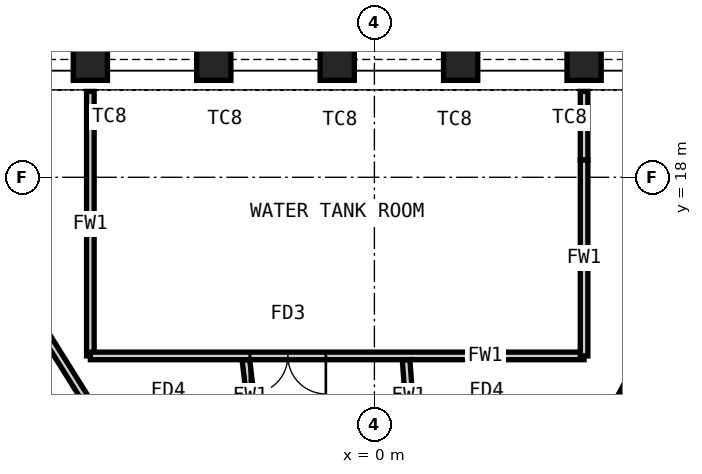
"""IFC4 building model, lengths in metres.
Left out: names, types, materials, properties, quantities, classifications, styles, units other than length and angle.
Written with IfcOpenShell. Run it as: python <this file> out.ifc"""

import sys

from ifc_helpers import new_model, si_unit, direction, frame, frame_2d, origin, origin_2d, place, context, subcontext, project, spatial, rectangle, hollow_rectangle, extrude, element, fill, save


model = new_model("IFC4")
c1 = context("Model", 3, precision=1e-05, world=origin(), true_north=direction((0.0, 1.0)))
c2 = subcontext(c1, "Body", "Model", "MODEL_VIEW")
j1 = project(units=[si_unit("LENGTHUNIT", "METRE"), si_unit("PLANEANGLEUNIT", "RADIAN")], contexts=[c1])
p1 = place(None, origin())
s1 = spatial("IfcSite", under=j1, at=p1, CompositionType="ELEMENT")
p2 = place(p1, origin())
s2 = spatial("IfcBuilding", under=s1, at=p2, CompositionType="ELEMENT")
p3 = place(p2, frame((0.0, 0.0, 337.6)))
s3 = spatial("IfcBuildingStorey", under=s2, at=p3, CompositionType="ELEMENT", Elevation=337.6)
for number, where, z_axis, x_axis in (
    (1, (-7.474, 21.0, 0.0), (0.0, 0.0, 1.0), (-1.0, 0.0, 0.0)),
    (2, (-4.226, 21.0, 0.0), (0.0, 0.0, 1.0), (-1.0, 0.0, 0.0)),
    (3, (-0.978, 21.0, 0.0), (0.0, 0.0, 1.0), (-1.0, 0.0, 0.0)),
    (4, (2.27, 21.0, 0.0), (0.0, 0.0, 1.0), (-1.0, 0.0, 0.0)),
    (5, (5.518, 21.0, 0.0), (0.0, 0.0, 1.0), (-1.0, 0.0, 0.0)),
):
    element("IfcColumn", number, at=place(p3, frame(where, z_axis=z_axis, x_axis=x_axis)), inside=s3, PredefinedType="COLUMN", context=c2, shape_type="SweptSolid", body=[
        extrude(hollow_rectangle(XDim=0.9, YDim=0.9, WallThickness=0.05, at=origin_2d()), origin(), (0.0, 0.0, 1.0), 6.0),
    ])
p4 = place(p3, frame((-7.474, 20.26, 0.0), z_axis=(0.0, 0.0, 1.0), x_axis=(0.0, -1.0, 0.0)))
e6 = element("IfcWall", 6, at=p4, inside=s3, PredefinedType="PARTITIONING", context=c2, shape_type="SweptSolid", body=[
    extrude(rectangle(XDim=6.96, YDim=0.2, at=frame_2d((3.48, 0.0))), origin(), (0.0, 0.0, 1.0), 5.75),
])
p5 = place(p3, frame((5.518, 20.26, 0.0), z_axis=(0.0, 0.0, 1.0), x_axis=(0.0, -1.0, 0.0)))
e7 = element("IfcWall", 7, at=p5, inside=s3, PredefinedType="PARTITIONING", context=c2, shape_type="SweptSolid", body=[
    extrude(rectangle(XDim=1.805, YDim=0.2, at=frame_2d((0.902, 0.0))), origin(), (0.0, 0.0, 1.0), 4.65),
])
p6 = place(p3, frame((-7.474, 13.3, 0.0), z_axis=(0.0, 0.0, 1.0), x_axis=(1.0, 0.0, 0.0)))
e8 = element("IfcWall", 8, at=p6, inside=s3, PredefinedType="PARTITIONING", context=c2, shape_type="SweptSolid", body=[
    extrude(rectangle(XDim=12.992, YDim=0.2, at=frame_2d((6.496, 0.0))), origin(), (0.0, 0.0, 1.0), 5.75),
])
p7 = place(p6, frame((4.197, 0.0, 0.0)))
e9 = element("IfcOpeningElement", 9, at=p7, cuts=e8, PredefinedType="OPENING", context=c2, shape_type="SweptSolid", body=[
    extrude(rectangle(XDim=2.0, YDim=2.4, at=frame_2d((1.0, 1.2))), frame((0.0, 0.11, 0.0), z_axis=(0.0, -1.0, 0.0), x_axis=(1.0, 0.0, 0.0)), (0.0, 0.0, 1.0), 0.22),
])
p8 = place(p3, frame((0.834, 13.195, 0.0), z_axis=(0.0, 0.0, 1.0), x_axis=(0.073292493621, -0.997310488453, 0.0)))
e10 = element("IfcWall", 10, at=p8, inside=s3, PredefinedType="PARTITIONING", context=c2, shape_type="SweptSolid", body=[
    extrude(rectangle(XDim=1.925, YDim=0.2, at=frame_2d((0.963, 0.0))), origin(), (0.0, 0.0, 1.0), 4.65),
])
p9 = place(p3, frame((-3.153, 11.275, 0.0), z_axis=(0.0, 0.0, 1.0), x_axis=(-0.118049862702, 0.993007668609, 0.0)))
e11 = element("IfcWall", 11, at=p9, inside=s3, PredefinedType="PARTITIONING", context=c2, shape_type="SweptSolid", body=[
    extrude(rectangle(XDim=1.934, YDim=0.2, at=frame_2d((0.967, 0.0))), origin(), (0.0, 0.0, 1.0), 4.85),
])
p10 = place(p3, frame((5.995, 11.275, 0.0), z_axis=(0.0, 0.0, 1.0), x_axis=(0.469452402124, 0.882957780497, 0.0)))
e12 = element("IfcWall", 12, at=p10, inside=s3, PredefinedType="PARTITIONING", context=c2, shape_type="SweptSolid", body=[
    extrude(rectangle(XDim=9.229, YDim=0.2, at=frame_2d((4.615, 0.0))), origin(), (0.0, 0.0, 1.0), 5.75),
])
p11 = place(p3, frame((-7.045, 11.275, 0.0), z_axis=(0.0, 0.0, 1.0), x_axis=(-0.529918611936, 0.848048503756, 0.0)))
e13 = element("IfcWall", 13, at=p11, inside=s3, PredefinedType="PARTITIONING", context=c2, shape_type="SweptSolid", body=[
    extrude(rectangle(XDim=9.562, YDim=0.2, at=frame_2d((4.781, 0.0))), origin(), (0.0, 0.0, 1.0), 5.75),
])
p12 = place(p3, frame((5.518, 18.455, 0.0), z_axis=(0.0, 0.0, 1.0), x_axis=(0.0, -1.0, 0.0)))
e14 = element("IfcWall", 14, at=p12, inside=s3, PredefinedType="PARTITIONING", context=c2, shape_type="SweptSolid", body=[
    extrude(rectangle(XDim=5.155, YDim=0.2, at=frame_2d((2.578, 0.0))), origin(), (0.0, 0.0, 1.0), 5.75),
])
p13 = place(p7, origin())
e15 = element("IfcDoor", 15, at=p13, inside=s3, OperationType="DOUBLE_DOOR_DOUBLE_SWING", PredefinedType="DOOR", context=c2, shape_type="SweptSolid", body=[
    extrude(rectangle(XDim=2.0, YDim=2.4, at=frame_2d((1.0, 1.2))), frame((0.0, 0.025, 0.0), z_axis=(0.0, -1.0, 0.0), x_axis=(1.0, 0.0, 0.0)), (0.0, 0.0, 1.0), 0.05),
])
fill(e9, e15)
save(model, sys.argv[1])
